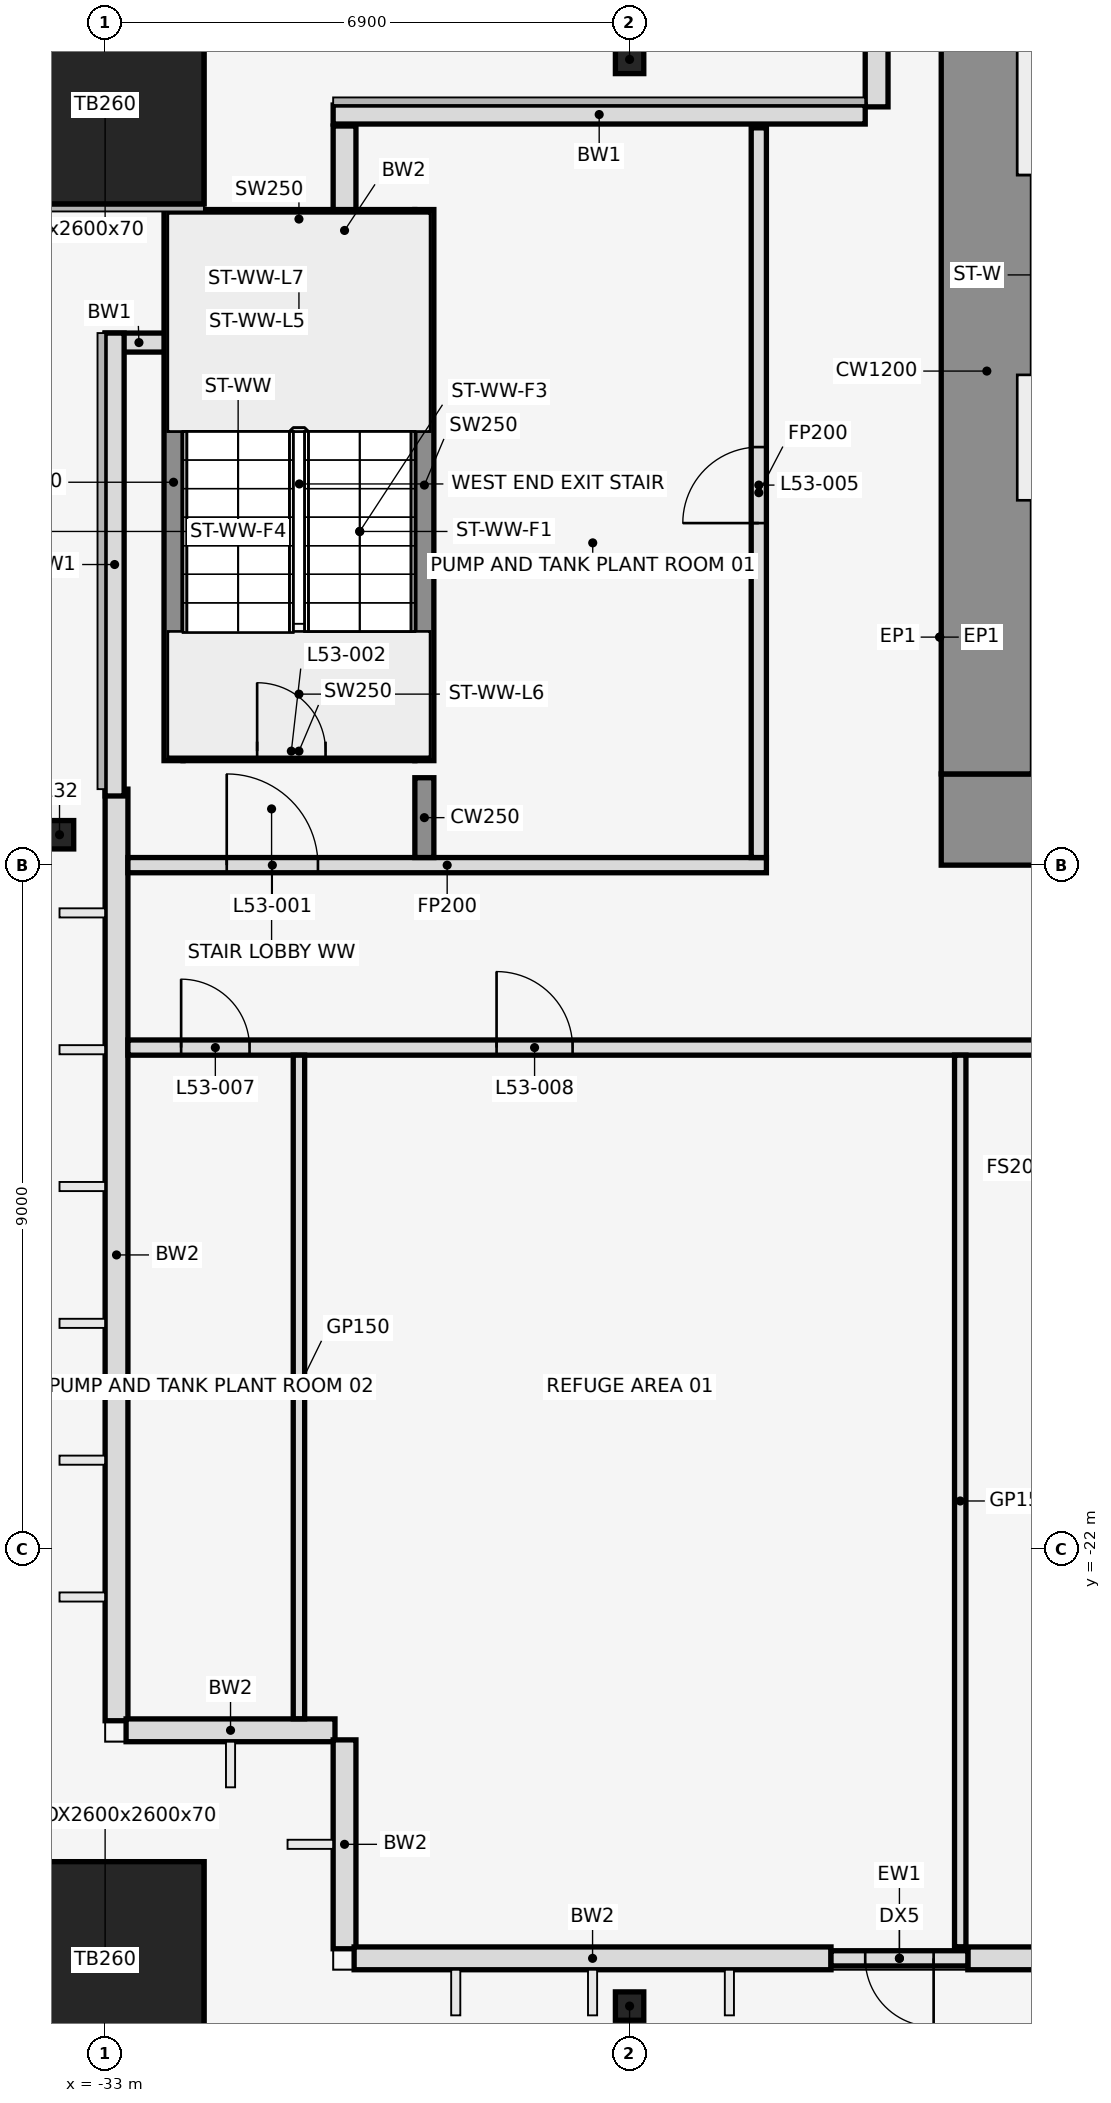
"""IFC4 building model, lengths in metres.
Left out: names, types, materials, properties, quantities, classifications, styles, units other than length and angle.
Written with IfcOpenShell. Run it as: python <this file> out.ifc"""

import sys

from ifc_helpers import new_model, si_unit, direction, frame, frame_2d, origin, origin_2d, place, context, subcontext, project, spatial, rectangle, hollow_rectangle, i_section, extrude, element, fill, save


model = new_model("IFC4")
c1 = context("Model", 3, precision=1e-05, world=origin(), true_north=direction((0.0, 1.0)))
c2 = subcontext(c1, "Body", "Model", "MODEL_VIEW")
j1 = project(units=[si_unit("LENGTHUNIT", "METRE"), si_unit("PLANEANGLEUNIT", "RADIAN")], contexts=[c1])
p1 = place(None, origin())
s1 = spatial("IfcSite", under=j1, at=p1, CompositionType="ELEMENT")
p2 = place(p1, origin())
s2 = spatial("IfcBuilding", under=s1, at=p2, CompositionType="ELEMENT")
p3 = place(p2, frame((0.0, 0.0, 236.0)))
s3 = spatial("IfcBuildingStorey", under=s2, at=p3, CompositionType="ELEMENT", Elevation=236.0)
for number, where, z_axis, x_axis in (
    (1, (-33.0, -27.41, 0.0), (0.0, 0.0, 1.0), (1.0, 0.0, 0.0)),
    (2, (-33.0, -3.0, 0.0), (0.0, 0.0, 1.0), (1.0, 0.0, 0.0)),
):
    element("IfcColumn", number, at=place(p3, frame(where, z_axis=z_axis, x_axis=x_axis)), inside=s3, PredefinedType="COLUMN", context=c2, shape_type="SweptSolid", body=[
        extrude(hollow_rectangle(XDim=2.6, YDim=2.6, WallThickness=0.07, at=origin_2d()), origin(), (0.0, 0.0, 1.0), 4.98),
    ])
for number, where, z_axis, x_axis in (
    (3, (-26.1, -28.01, 0.0), (0.0, 0.0, 1.0), (1.0, 0.0, 0.0)),
    (4, (-26.1, -2.4, 0.0), (0.0, 0.0, 1.0), (1.0, 0.0, 0.0)),
    (5, (-33.6, -12.6, 0.0), (0.0, 0.0, 1.0), (1.0, 0.0, 0.0)),
):
    element("IfcColumn", number, at=place(p3, frame(where, z_axis=z_axis, x_axis=x_axis)), inside=s3, PredefinedType="COLUMN", context=c2, shape_type="SweptSolid", body=[
        extrude(i_section(OverallWidth=0.373, OverallDepth=0.373, WebThickness=0.016, FlangeThickness=0.026, at=origin_2d()), origin(), (0.0, 0.0, 1.0), 5.4),
    ])
for number, where, z_axis, x_axis in (
    (6, (-33.0, -27.41, 4.98), (0.0, 0.0, 1.0), (1.0, 0.0, 0.0)),
    (7, (-33.0, -3.0, 4.98), (0.0, 0.0, 1.0), (1.0, 0.0, 0.0)),
):
    element("IfcColumn", number, at=place(p3, frame(where, z_axis=z_axis, x_axis=x_axis)), inside=s3, PredefinedType="COLUMN", context=c2, shape_type="SweptSolid", body=[
        extrude(rectangle(XDim=2.6, YDim=2.6, at=origin_2d()), origin(), (0.0, 0.0, 1.0), 0.42),
    ])
for number, where, z_axis, x_axis in (
    (8, (-22.85, -0.276, 0.0), (0.0, 0.0, 1.0), (0.0, -1.0, 0.0)),
    (9, (-29.85, -3.276, 0.0), (0.0, 0.0, 1.0), (0.0, -1.0, 0.0)),
):
    element("IfcWall", number, at=place(p3, frame(where, z_axis=z_axis, x_axis=x_axis)), inside=s3, PredefinedType="STANDARD", context=c2, shape_type="SweptSolid", body=[
        extrude(rectangle(XDim=2.748, YDim=0.3, at=frame_2d((1.374, 0.0))), origin(), (0.0, 0.0, 1.0), 5.25),
    ])
p4 = place(p3, frame((-32.85, -12.0, 0.0), z_axis=(0.0, 0.0, 1.0), x_axis=(0.0, -1.0, 0.0)))
e10 = element("IfcWall", 10, at=p4, inside=s3, PredefinedType="STANDARD", context=c2, shape_type="SweptSolid", body=[
    extrude(rectangle(XDim=12.256, YDim=0.3, at=frame_2d((6.128, 0.0))), origin(), (0.0, 0.0, 1.0), 4.338),
])
for number, where, z_axis, x_axis in (
    (11, (-32.724, -24.382, 0.0), (0.0, 0.0, 1.0), (1.0, 0.0, 0.0)),
    (12, (-29.85, -24.508, 0.0), (0.0, 0.0, 1.0), (0.0, -1.0, 0.0)),
):
    element("IfcWall", number, at=place(p3, frame(where, z_axis=z_axis, x_axis=x_axis)), inside=s3, PredefinedType="STANDARD", context=c2, shape_type="SweptSolid", body=[
        extrude(rectangle(XDim=2.748, YDim=0.3, at=frame_2d((1.374, 0.0))), origin(), (0.0, 0.0, 1.0), 4.572),
    ])
p5 = place(p3, frame((-29.724, -27.382, 0.0), z_axis=(0.0, 0.0, 1.0), x_axis=(1.0, 0.0, 0.0)))
e13 = element("IfcWall", 13, at=p5, inside=s3, PredefinedType="STANDARD", context=c2, shape_type="SweptSolid", body=[
    extrude(rectangle(XDim=6.274, YDim=0.3, at=frame_2d((3.137, 0.0))), origin(), (0.0, 0.0, 1.0), 4.572),
])
p6 = place(p3, frame((-21.65, -27.382, 0.0), z_axis=(0.0, 0.0, 1.0), x_axis=(1.0, 0.0, 0.0)))
e14 = element("IfcWall", 14, at=p6, inside=s3, PredefinedType="STANDARD", context=c2, shape_type="SweptSolid", body=[
    extrude(rectangle(XDim=6.035, YDim=0.3, at=frame_2d((3.018, 0.0))), origin(), (0.0, 0.0, 1.0), 4.572),
])
p7 = place(p3, frame((-21.65, -27.382, 0.0), z_axis=(0.0, 0.0, 1.0), x_axis=(-1.0, 0.0, 0.0)))
e15 = element("IfcWall", 15, at=p7, inside=s3, PredefinedType="STANDARD", context=c2, shape_type="SweptSolid", body=[
    extrude(rectangle(XDim=1.8, YDim=0.2, at=frame_2d((0.9, 0.0))), origin(), (0.0, 0.0, 1.0), 5.25),
])
p8 = place(p7, frame((0.45, 0.0, 0.0)))
e16 = element("IfcOpeningElement", 16, at=p8, cuts=e15, PredefinedType="OPENING", context=c2, shape_type="SweptSolid", body=[
    extrude(rectangle(XDim=0.9, YDim=2.1, at=frame_2d((0.45, 1.05))), frame((0.0, 0.112, 0.0), z_axis=(0.0, -1.0, 0.0), x_axis=(1.0, 0.0, 0.0)), (0.0, 0.0, 1.0), 0.224),
])
p9 = place(p3, frame((-23.0, -3.125, 0.0), z_axis=(0.0, 0.0, 1.0), x_axis=(-1.0, 0.0, 0.0)))
e17 = element("IfcWall", 17, at=p9, inside=s3, PredefinedType="STANDARD", context=c2, shape_type="SweptSolid", body=[
    extrude(rectangle(XDim=7.0, YDim=0.25, at=frame_2d((3.5, 0.0))), origin(), (0.0, 0.0, 1.0), 5.25),
])
p10 = place(p3, frame((-32.11, -6.125, 0.0), z_axis=(0.0, 0.0, 1.0), x_axis=(-1.0, 0.0, 0.0)))
e18 = element("IfcWall", 18, at=p10, inside=s3, PredefinedType="STANDARD", context=c2, shape_type="SweptSolid", body=[
    extrude(rectangle(XDim=0.89, YDim=0.25, at=frame_2d((0.445, 0.0))), origin(), (0.0, 0.0, 1.0), 5.25),
])
p11 = place(p3, frame((-32.875, -6.0, 0.0), z_axis=(0.0, 0.0, 1.0), x_axis=(0.0, -1.0, 0.0)))
e19 = element("IfcWall", 19, at=p11, inside=s3, PredefinedType="STANDARD", context=c2, shape_type="SweptSolid", body=[
    extrude(rectangle(XDim=6.09, YDim=0.25, at=frame_2d((3.045, 0.0))), origin(), (0.0, 0.0, 1.0), 5.25),
])
p12 = place(p3, frame((-32.1, -11.625, 0.0), z_axis=(0.0, 0.0, 1.0), x_axis=(0.0, 1.0, 0.0)))
e20 = element("IfcWall", 20, at=p12, inside=s3, PredefinedType="SHEAR", context=c2, shape_type="SweptSolid", body=[
    extrude(rectangle(XDim=7.325, YDim=0.25, at=frame_2d((3.663, 0.0))), origin(), (0.0, 0.0, 1.0), 5.4),
])
p13 = place(p3, frame((-28.8, -11.625, 0.0), z_axis=(0.0, 0.0, 1.0), x_axis=(0.0, 1.0, 0.0)))
e21 = element("IfcWall", 21, at=p13, inside=s3, PredefinedType="SHEAR", context=c2, shape_type="SweptSolid", body=[
    extrude(rectangle(XDim=7.25, YDim=0.25, at=frame_2d((3.625, 0.0))), origin(), (0.0, 0.0, 1.0), 5.4),
])
p14 = place(p3, frame((-31.975, -11.5, 0.0), z_axis=(0.0, 0.0, 1.0), x_axis=(1.0, 0.0, 0.0)))
e22 = element("IfcWall", 22, at=p14, inside=s3, PredefinedType="SHEAR", context=c2, shape_type="SweptSolid", body=[
    extrude(rectangle(XDim=3.05, YDim=0.25, at=frame_2d((1.525, 0.0))), origin(), (0.0, 0.0, 1.0), 5.4),
])
p15 = place(p14, frame((0.975, 0.0, 0.0)))
e23 = element("IfcOpeningElement", 23, at=p15, cuts=e22, PredefinedType="OPENING", context=c2, shape_type="SweptSolid", body=[
    extrude(rectangle(XDim=0.9, YDim=2.1, at=frame_2d((0.45, 1.05))), frame((0.0, 0.137, 0.0), z_axis=(0.0, -1.0, 0.0), x_axis=(1.0, 0.0, 0.0)), (0.0, 0.0, 1.0), 0.274),
])
p16 = place(p3, frame((-31.975, -4.5, 0.0), z_axis=(0.0, 0.0, 1.0), x_axis=(1.0, 0.0, 0.0)))
e24 = element("IfcWall", 24, at=p16, inside=s3, PredefinedType="SHEAR", context=c2, shape_type="SweptSolid", body=[
    extrude(rectangle(XDim=3.05, YDim=0.25, at=frame_2d((1.525, 0.0))), origin(), (0.0, 0.0, 1.0), 5.4),
])
p17 = place(p3, frame((-32.7, -15.4, 0.0), z_axis=(0.0, 0.0, 1.0), x_axis=(1.0, 0.0, 0.0)))
e25 = element("IfcWall", 25, at=p17, inside=s3, PredefinedType="PARTITIONING", context=c2, shape_type="SweptSolid", body=[
    extrude(rectangle(XDim=65.4, YDim=0.2, at=frame_2d((32.7, 0.0))), origin(), (0.0, 0.0, 1.0), 4.318),
])
p18 = place(p17, frame((0.7, 0.0, 0.0)))
e26 = element("IfcOpeningElement", 26, at=p18, cuts=e25, PredefinedType="OPENING", context=c2, shape_type="SweptSolid", body=[
    extrude(rectangle(XDim=0.9, YDim=2.1, at=frame_2d((0.45, 1.05))), frame((0.0, 0.112, 0.0), z_axis=(0.0, -1.0, 0.0), x_axis=(1.0, 0.0, 0.0)), (0.0, 0.0, 1.0), 0.224),
])
p19 = place(p17, frame((4.85, 0.0, 0.0)))
e27 = element("IfcOpeningElement", 27, at=p19, cuts=e25, PredefinedType="OPENING", context=c2, shape_type="SweptSolid", body=[
    extrude(rectangle(XDim=1.0, YDim=2.1, at=frame_2d((0.5, 1.05))), frame((0.0, 0.112, 0.0), z_axis=(0.0, -1.0, 0.0), x_axis=(1.0, 0.0, 0.0)), (0.0, 0.0, 1.0), 0.224),
])
p20 = place(p17, frame((14.85, 0.0, 0.0)))
e28 = element("IfcOpeningElement", 28, at=p20, cuts=e25, PredefinedType="OPENING", context=c2, shape_type="SweptSolid", body=[
    extrude(rectangle(XDim=1.0, YDim=2.1, at=frame_2d((0.5, 1.05))), frame((0.0, 0.112, 0.0), z_axis=(0.0, -1.0, 0.0), x_axis=(1.0, 0.0, 0.0)), (0.0, 0.0, 1.0), 0.224),
])
p21 = place(p17, frame((23.55, 0.0, 0.0)))
e29 = element("IfcOpeningElement", 29, at=p21, cuts=e25, PredefinedType="OPENING", context=c2, shape_type="SweptSolid", body=[
    extrude(rectangle(XDim=1.0, YDim=2.1, at=frame_2d((0.5, 1.05))), frame((0.0, 0.112, 0.0), z_axis=(0.0, -1.0, 0.0), x_axis=(1.0, 0.0, 0.0)), (0.0, 0.0, 1.0), 0.224),
])
p22 = place(p17, frame((34.4, 0.0, 0.0)))
e30 = element("IfcOpeningElement", 30, at=p22, cuts=e25, PredefinedType="OPENING", context=c2, shape_type="SweptSolid", body=[
    extrude(rectangle(XDim=1.0, YDim=2.1, at=frame_2d((0.5, 1.05))), frame((0.0, 0.112, 0.0), z_axis=(0.0, -1.0, 0.0), x_axis=(1.0, 0.0, 0.0)), (0.0, 0.0, 1.0), 0.224),
])
p23 = place(p17, frame((40.95, 0.0, 0.0)))
e31 = element("IfcOpeningElement", 31, at=p23, cuts=e25, PredefinedType="OPENING", context=c2, shape_type="SweptSolid", body=[
    extrude(rectangle(XDim=1.0, YDim=2.1, at=frame_2d((0.5, 1.05))), frame((0.0, 0.112, 0.0), z_axis=(0.0, -1.0, 0.0), x_axis=(1.0, 0.0, 0.0)), (0.0, 0.0, 1.0), 0.224),
])
p24 = place(p17, frame((49.65, 0.0, 0.0)))
e32 = element("IfcOpeningElement", 32, at=p24, cuts=e25, PredefinedType="OPENING", context=c2, shape_type="SweptSolid", body=[
    extrude(rectangle(XDim=0.9, YDim=2.1, at=frame_2d((0.45, 1.05))), frame((0.0, 0.112, 0.0), z_axis=(0.0, -1.0, 0.0), x_axis=(1.0, 0.0, 0.0)), (0.0, 0.0, 1.0), 0.224),
])
p25 = place(p17, frame((59.55, 0.0, 0.0)))
e33 = element("IfcOpeningElement", 33, at=p25, cuts=e25, PredefinedType="OPENING", context=c2, shape_type="SweptSolid", body=[
    extrude(rectangle(XDim=1.0, YDim=2.1, at=frame_2d((0.5, 1.05))), frame((0.0, 0.112, 0.0), z_axis=(0.0, -1.0, 0.0), x_axis=(1.0, 0.0, 0.0)), (0.0, 0.0, 1.0), 0.224),
])
p26 = place(p17, frame((63.85, 0.0, 0.0)))
e34 = element("IfcOpeningElement", 34, at=p26, cuts=e25, PredefinedType="OPENING", context=c2, shape_type="SweptSolid", body=[
    extrude(rectangle(XDim=0.9, YDim=2.1, at=frame_2d((0.45, 1.05))), frame((0.0, 0.112, 0.0), z_axis=(0.0, -1.0, 0.0), x_axis=(1.0, 0.0, 0.0)), (0.0, 0.0, 1.0), 0.224),
])
p27 = place(p3, frame((-32.7, -13.0, 0.0), z_axis=(0.0, 0.0, 1.0), x_axis=(1.0, 0.0, 0.0)))
e35 = element("IfcWall", 35, at=p27, inside=s3, PredefinedType="PARTITIONING", context=c2, shape_type="SweptSolid", body=[
    extrude(rectangle(XDim=8.4, YDim=0.2, at=frame_2d((4.2, 0.0))), origin(), (0.0, 0.0, 1.0), 4.318),
])
p28 = place(p27, frame((1.3, 0.0, 0.0)))
e36 = element("IfcOpeningElement", 36, at=p28, cuts=e35, PredefinedType="OPENING", context=c2, shape_type="SweptSolid", body=[
    extrude(rectangle(XDim=1.2, YDim=2.1, at=frame_2d((0.6, 1.05))), frame((0.0, 0.112, 0.0), z_axis=(0.0, -1.0, 0.0), x_axis=(1.0, 0.0, 0.0)), (0.0, 0.0, 1.0), 0.224),
])
p29 = place(p3, frame((-30.45, -24.23, 0.0), z_axis=(0.0, 0.0, 1.0), x_axis=(0.0, 1.0, 0.0)))
e37 = element("IfcWall", 37, at=p29, inside=s3, PredefinedType="PARTITIONING", context=c2, shape_type="SweptSolid", body=[
    extrude(rectangle(XDim=8.73, YDim=0.15, at=frame_2d((4.365, 0.0))), origin(), (0.0, 0.0, 1.0), 4.318),
])
p30 = place(p3, frame((-28.8, -12.9, 0.0), z_axis=(0.0, 0.0, 1.0), x_axis=(0.0, 1.0, 0.0)))
e38 = element("IfcWall", 38, at=p30, inside=s3, PredefinedType="SHEAR", context=c2, shape_type="SweptSolid", body=[
    extrude(rectangle(XDim=1.05, YDim=0.25, at=frame_2d((0.525, 0.0))), origin(), (0.0, 0.0, 1.0), 5.4),
])
p31 = place(p3, frame((-24.4, -12.9, 0.0), z_axis=(0.0, 0.0, 1.0), x_axis=(0.0, 1.0, 0.0)))
e39 = element("IfcWall", 39, at=p31, inside=s3, PredefinedType="PARTITIONING", context=c2, shape_type="SweptSolid", body=[
    extrude(rectangle(XDim=9.6, YDim=0.2, at=frame_2d((4.8, 0.0))), origin(), (0.0, 0.0, 1.0), 4.318),
])
p32 = place(p31, frame((4.4, 0.0, 0.0)))
e40 = element("IfcOpeningElement", 40, at=p32, cuts=e39, PredefinedType="OPENING", context=c2, shape_type="SweptSolid", body=[
    extrude(rectangle(XDim=1.0, YDim=2.1, at=frame_2d((0.5, 1.05))), frame((0.0, 0.112, 0.0), z_axis=(0.0, -1.0, 0.0), x_axis=(1.0, 0.0, 0.0)), (0.0, 0.0, 1.0), 0.224),
])
p33 = place(p3, frame((-21.75, -27.23, 0.0), z_axis=(0.0, 0.0, 1.0), x_axis=(0.0, 1.0, 0.0)))
e41 = element("IfcWall", 41, at=p33, inside=s3, PredefinedType="PARTITIONING", context=c2, shape_type="SweptSolid", body=[
    extrude(rectangle(XDim=11.73, YDim=0.15, at=frame_2d((5.865, 0.0))), origin(), (0.0, 0.0, 1.0), 4.318),
])
p34 = place(p3, frame((-22.0, -12.4, 0.0), z_axis=(0.0, 0.0, 1.0), x_axis=(1.0, 0.0, 0.0)))
e42 = element("IfcWall", 42, at=p34, inside=s3, PredefinedType="SHEAR", context=c2, shape_type="SweptSolid", body=[
    extrude(rectangle(XDim=44.0, YDim=1.2, at=frame_2d((22.0, 0.0))), origin(), (0.0, 0.0, 1.0), 5.4),
])
p35 = place(p34, frame((2.2, 0.0, 0.0)))
e43 = element("IfcOpeningElement", 43, at=p35, cuts=e42, PredefinedType="OPENING", context=c2, shape_type="SweptSolid", body=[
    extrude(rectangle(XDim=1.2, YDim=2.1, at=frame_2d((0.6, 1.05))), frame((0.0, 0.612, 0.0), z_axis=(0.0, -1.0, 0.0), x_axis=(1.0, 0.0, 0.0)), (0.0, 0.0, 1.0), 1.224),
])
p36 = place(p34, frame((21.4, 0.0, 0.0)))
e44 = element("IfcOpeningElement", 44, at=p36, cuts=e42, PredefinedType="OPENING", context=c2, shape_type="SweptSolid", body=[
    extrude(rectangle(XDim=1.2, YDim=2.1, at=frame_2d((0.6, 1.05))), frame((0.0, 0.612, 0.0), z_axis=(0.0, -1.0, 0.0), x_axis=(1.0, 0.0, 0.0)), (0.0, 0.0, 1.0), 1.224),
])
p37 = place(p34, frame((40.6, 0.0, 0.0)))
e45 = element("IfcOpeningElement", 45, at=p37, cuts=e42, PredefinedType="OPENING", context=c2, shape_type="SweptSolid", body=[
    extrude(rectangle(XDim=1.2, YDim=2.1, at=frame_2d((0.6, 1.05))), frame((0.0, 0.612, 0.0), z_axis=(0.0, -1.0, 0.0), x_axis=(1.0, 0.0, 0.0)), (0.0, 0.0, 1.0), 1.224),
])
p38 = place(p34, frame((16.0, 0.0, 0.0)))
e46 = element("IfcOpeningElement", 46, at=p38, cuts=e42, PredefinedType="OPENING", context=c2, shape_type="SweptSolid", body=[
    extrude(rectangle(XDim=1.8, YDim=2.1, at=frame_2d((0.9, 1.05))), frame((0.0, 0.612, 0.0), z_axis=(0.0, -1.0, 0.0), x_axis=(1.0, 0.0, 0.0)), (0.0, 0.0, 1.0), 1.224),
])
p39 = place(p34, frame((6.3, 0.0, 0.0)))
e47 = element("IfcOpeningElement", 47, at=p39, cuts=e42, PredefinedType="OPENING", context=c2, shape_type="SweptSolid", body=[
    extrude(rectangle(XDim=1.2, YDim=2.1, at=frame_2d((0.6, 1.05))), frame((0.0, 0.612, 0.0), z_axis=(0.0, -1.0, 0.0), x_axis=(1.0, 0.0, 0.0)), (0.0, 0.0, 1.0), 1.224),
])
p40 = place(p34, frame((26.2, 0.0, 0.0)))
e48 = element("IfcOpeningElement", 48, at=p40, cuts=e42, PredefinedType="OPENING", context=c2, shape_type="SweptSolid", body=[
    extrude(rectangle(XDim=1.8, YDim=2.1, at=frame_2d((0.9, 1.05))), frame((0.0, 0.612, 0.0), z_axis=(0.0, -1.0, 0.0), x_axis=(1.0, 0.0, 0.0)), (0.0, 0.0, 1.0), 1.224),
])
p41 = place(p34, frame((36.5, 0.0, 0.0)))
e49 = element("IfcOpeningElement", 49, at=p41, cuts=e42, PredefinedType="OPENING", context=c2, shape_type="SweptSolid", body=[
    extrude(rectangle(XDim=1.2, YDim=2.1, at=frame_2d((0.6, 1.05))), frame((0.0, 0.612, 0.0), z_axis=(0.0, -1.0, 0.0), x_axis=(1.0, 0.0, 0.0)), (0.0, 0.0, 1.0), 1.224),
])
p42 = place(p3, frame((-21.4, -11.8, 0.0), z_axis=(0.0, 0.0, 1.0), x_axis=(0.0, 1.0, 0.0)))
e50 = element("IfcWall", 50, at=p42, inside=s3, PredefinedType="SHEAR", context=c2, shape_type="SweptSolid", body=[
    extrude(rectangle(XDim=10.6, YDim=1.2, at=frame_2d((5.3, 0.0))), origin(), (0.0, 0.0, 1.0), 5.4),
])
p43 = place(p8, origin())
e51 = element("IfcDoor", 51, at=p43, inside=s3, OperationType="SINGLE_SWING_LEFT", PredefinedType="DOOR", context=c2, shape_type="SweptSolid", body=[
    extrude(rectangle(XDim=0.9, YDim=2.1, at=frame_2d((0.45, 1.05))), frame((0.0, 0.025, 0.0), z_axis=(0.0, -1.0, 0.0), x_axis=(1.0, 0.0, 0.0)), (0.0, 0.0, 1.0), 0.05),
])
fill(e16, e51)
p44 = place(p28, origin())
e52 = element("IfcDoor", 52, at=p44, inside=s3, OperationType="SINGLE_SWING_LEFT", PredefinedType="DOOR", context=c2, shape_type="SweptSolid", body=[
    extrude(rectangle(XDim=1.2, YDim=2.1, at=frame_2d((0.6, 1.05))), frame((0.0, 0.025, 0.0), z_axis=(0.0, -1.0, 0.0), x_axis=(1.0, 0.0, 0.0)), (0.0, 0.0, 1.0), 0.05),
])
fill(e36, e52)
p45 = place(p15, origin())
e53 = element("IfcDoor", 53, at=p45, inside=s3, OperationType="SINGLE_SWING_LEFT", PredefinedType="DOOR", context=c2, shape_type="SweptSolid", body=[
    extrude(rectangle(XDim=0.9, YDim=2.1, at=frame_2d((0.45, 1.05))), frame((0.0, 0.025, 0.0), z_axis=(0.0, -1.0, 0.0), x_axis=(1.0, 0.0, 0.0)), (0.0, 0.0, 1.0), 0.05),
])
fill(e23, e53)
p46 = place(p32, origin())
e54 = element("IfcDoor", 54, at=p46, inside=s3, OperationType="SINGLE_SWING_LEFT", PredefinedType="DOOR", context=c2, shape_type="SweptSolid", body=[
    extrude(rectangle(XDim=1.0, YDim=2.1, at=frame_2d((0.5, 1.05))), frame((0.0, 0.025, 0.0), z_axis=(0.0, -1.0, 0.0), x_axis=(1.0, 0.0, 0.0)), (0.0, 0.0, 1.0), 0.05),
])
fill(e40, e54)
p47 = place(p18, frame((0.9, 0.0, 0.0), z_axis=(0.0, 0.0, 1.0), x_axis=(-1.0, 0.0, 0.0)))
e55 = element("IfcDoor", 55, at=p47, inside=s3, OperationType="SINGLE_SWING_LEFT", PredefinedType="DOOR", context=c2, shape_type="SweptSolid", body=[
    extrude(rectangle(XDim=0.9, YDim=2.1, at=frame_2d((0.45, 1.05))), frame((0.0, 0.025, 0.0), z_axis=(0.0, -1.0, 0.0), x_axis=(1.0, 0.0, 0.0)), (0.0, 0.0, 1.0), 0.05),
])
fill(e26, e55)
p48 = place(p19, frame((1.0, 0.0, 0.0), z_axis=(0.0, 0.0, 1.0), x_axis=(-1.0, 0.0, 0.0)))
e56 = element("IfcDoor", 56, at=p48, inside=s3, OperationType="SINGLE_SWING_RIGHT", PredefinedType="DOOR", context=c2, shape_type="SweptSolid", body=[
    extrude(rectangle(XDim=1.0, YDim=2.1, at=frame_2d((0.5, 1.05))), frame((0.0, 0.025, 0.0), z_axis=(0.0, -1.0, 0.0), x_axis=(1.0, 0.0, 0.0)), (0.0, 0.0, 1.0), 0.05),
])
fill(e27, e56)
save(model, sys.argv[1])
